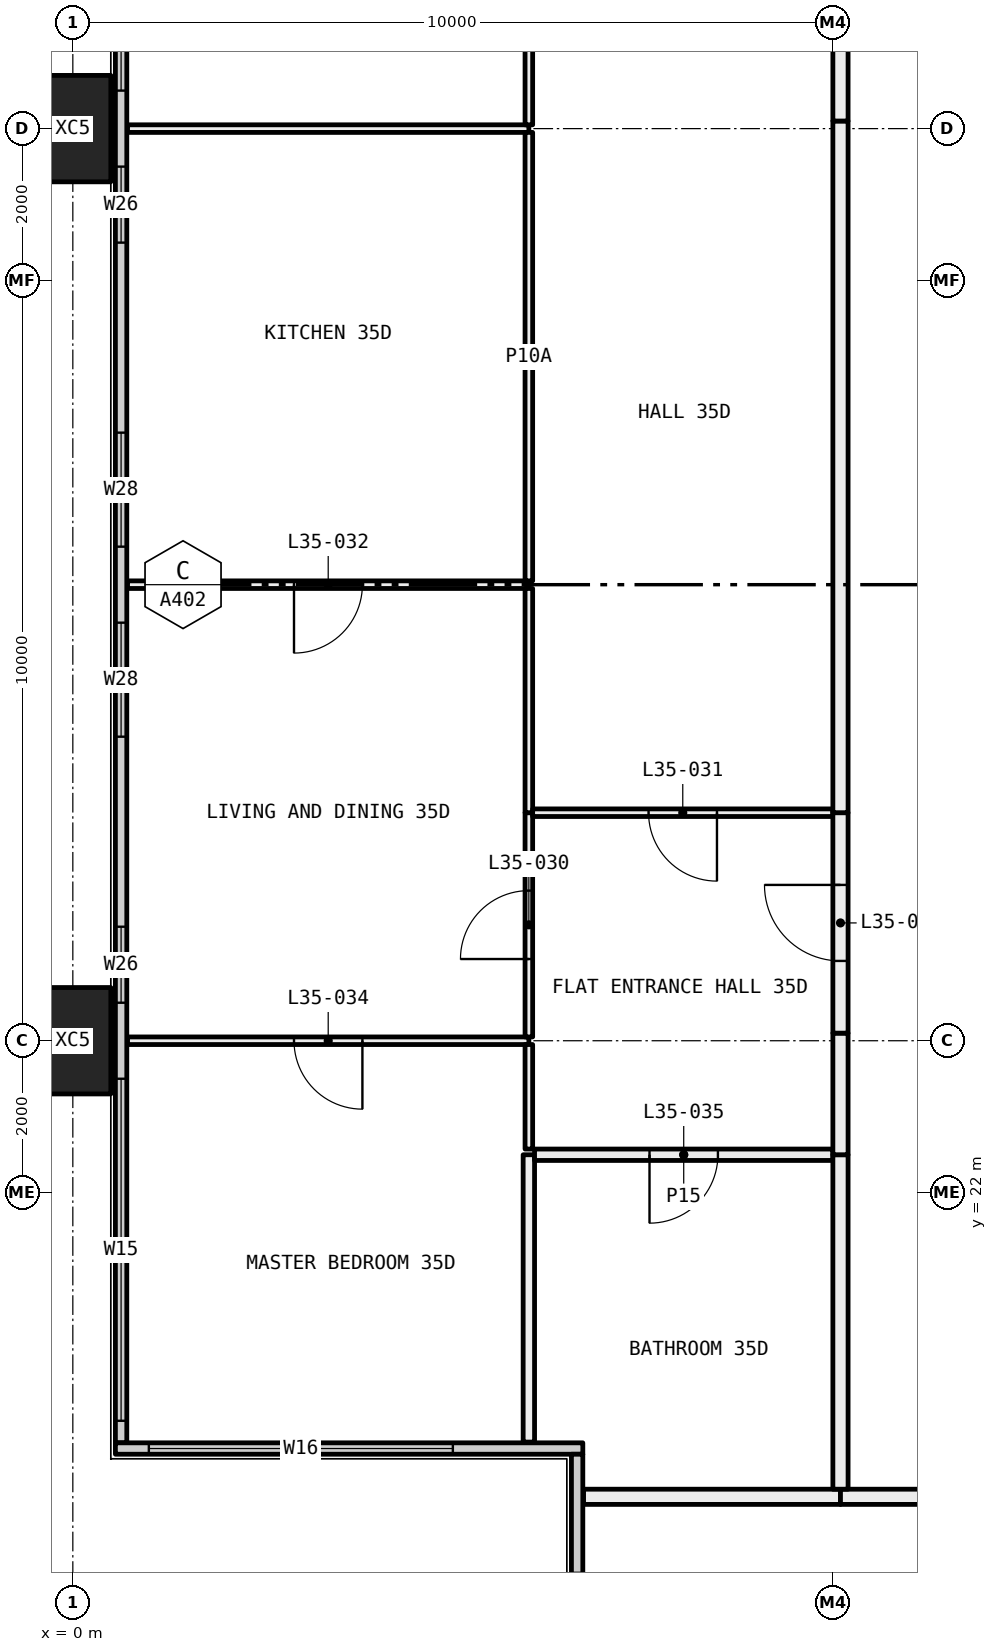
"""IFC4 building model, lengths in metres.
Left out: names, types, materials, properties, quantities, classifications, styles, units other than length and angle.
Written with IfcOpenShell. Run it as: python <this file> out.ifc"""

import sys

from ifc_helpers import new_model, si_unit, direction, frame, frame_2d, origin, origin_2d, place, context, subcontext, project, spatial, rectangle, hollow_rectangle, extrude, element, fill, save


model = new_model("IFC4")
c1 = context("Model", 3, precision=1e-05, world=origin(), true_north=direction((0.0, 1.0)))
c2 = subcontext(c1, "Body", "Model", "MODEL_VIEW")
j1 = project(units=[si_unit("LENGTHUNIT", "METRE"), si_unit("PLANEANGLEUNIT", "RADIAN")], contexts=[c1])
p1 = place(None, origin())
s1 = spatial("IfcSite", under=j1, at=p1, CompositionType="ELEMENT")
p2 = place(p1, origin())
s2 = spatial("IfcBuilding", under=s1, at=p2, CompositionType="ELEMENT")
p3 = place(p2, frame((0.0, 0.0, 134.55)))
s3 = spatial("IfcBuildingStorey", under=s2, at=p3, CompositionType="ELEMENT", Elevation=134.55)
for number, where, z_axis, x_axis in (
    (1, (0.0, 24.0, -0.4), (0.0, 0.0, 1.0), (0.0, 1.0, 0.0)),
    (2, (0.0, 36.0, -0.4), (0.0, 0.0, 1.0), (0.0, 1.0, 0.0)),
):
    element("IfcColumn", number, at=place(p3, frame(where, z_axis=z_axis, x_axis=x_axis)), inside=s3, PredefinedType="COLUMN", context=c2, shape_type="SweptSolid", body=[
        extrude(hollow_rectangle(XDim=1.4, YDim=1.0, WallThickness=0.055, at=origin_2d()), origin(), (0.0, 0.0, 1.0), 3.45),
    ])
p4 = place(p3, frame((0.635, 18.71, 0.0), z_axis=(0.0, 0.0, 1.0), x_axis=(0.0, 1.0, 0.0)))
e3 = element("IfcWall", 3, at=p4, inside=s3, PredefinedType="ELEMENTEDWALL", context=c2, shape_type="SweptSolid", body=[
    extrude(rectangle(XDim=22.58, YDim=0.15, at=frame_2d((11.29, 0.0))), origin(), (0.0, 0.0, 1.0), 3.05),
])
p5 = place(p4, frame((0.29, 0.0, 0.45)))
e4 = element("IfcOpeningElement", 4, at=p5, cuts=e3, PredefinedType="OPENING", context=c2, shape_type="SweptSolid", body=[
    extrude(rectangle(XDim=4.5, YDim=2.55, at=frame_2d((2.25, 1.275))), frame((0.0, 0.085, 0.0), z_axis=(0.0, -1.0, 0.0), x_axis=(1.0, 0.0, 0.0)), (0.0, 0.0, 1.0), 0.17),
])
p6 = place(p4, frame((5.79, 0.0, 0.45)))
e5 = element("IfcOpeningElement", 5, at=p6, cuts=e3, PredefinedType="OPENING", context=c2, shape_type="SweptSolid", body=[
    extrude(rectangle(XDim=1.0, YDim=2.55, at=frame_2d((0.5, 1.275))), frame((0.0, 0.085, 0.0), z_axis=(0.0, -1.0, 0.0), x_axis=(1.0, 0.0, 0.0)), (0.0, 0.0, 1.0), 0.17),
])
p7 = place(p4, frame((9.29, 0.0, 0.45)))
e6 = element("IfcOpeningElement", 6, at=p7, cuts=e3, PredefinedType="OPENING", context=c2, shape_type="SweptSolid", body=[
    extrude(rectangle(XDim=1.5, YDim=2.55, at=frame_2d((0.75, 1.275))), frame((0.0, 0.085, 0.0), z_axis=(0.0, -1.0, 0.0), x_axis=(1.0, 0.0, 0.0)), (0.0, 0.0, 1.0), 0.17),
])
p8 = place(p4, frame((11.79, 0.0, 0.45)))
e7 = element("IfcOpeningElement", 7, at=p8, cuts=e3, PredefinedType="OPENING", context=c2, shape_type="SweptSolid", body=[
    extrude(rectangle(XDim=1.5, YDim=2.55, at=frame_2d((0.75, 1.275))), frame((0.0, 0.085, 0.0), z_axis=(0.0, -1.0, 0.0), x_axis=(1.0, 0.0, 0.0)), (0.0, 0.0, 1.0), 0.17),
])
p9 = place(p4, frame((15.79, 0.0, 0.45)))
e8 = element("IfcOpeningElement", 8, at=p9, cuts=e3, PredefinedType="OPENING", context=c2, shape_type="SweptSolid", body=[
    extrude(rectangle(XDim=1.0, YDim=2.55, at=frame_2d((0.5, 1.275))), frame((0.0, 0.085, 0.0), z_axis=(0.0, -1.0, 0.0), x_axis=(1.0, 0.0, 0.0)), (0.0, 0.0, 1.0), 0.17),
])
p10 = place(p4, frame((17.79, 0.0, 0.45)))
e9 = element("IfcOpeningElement", 9, at=p10, cuts=e3, PredefinedType="OPENING", context=c2, shape_type="SweptSolid", body=[
    extrude(rectangle(XDim=4.5, YDim=2.55, at=frame_2d((2.25, 1.275))), frame((0.0, 0.085, 0.0), z_axis=(0.0, -1.0, 0.0), x_axis=(1.0, 0.0, 0.0)), (0.0, 0.0, 1.0), 0.17),
])
p11 = place(p3, frame((0.56, 18.635, 0.0), z_axis=(0.0, 0.0, 1.0), x_axis=(1.0, 0.0, 0.0)))
e10 = element("IfcWall", 10, at=p11, inside=s3, PredefinedType="ELEMENTEDWALL", context=c2, shape_type="SweptSolid", body=[
    extrude(rectangle(XDim=6.15, YDim=0.15, at=frame_2d((3.075, 0.0))), origin(), (0.0, 0.0, 1.0), 3.05),
])
p12 = place(p11, frame((0.44, 0.0, 0.45)))
e11 = element("IfcOpeningElement", 11, at=p12, cuts=e10, PredefinedType="OPENING", context=c2, shape_type="SweptSolid", body=[
    extrude(rectangle(XDim=4.0, YDim=2.55, at=frame_2d((2.0, 1.275))), frame((0.0, 0.085, 0.0), z_axis=(0.0, -1.0, 0.0), x_axis=(1.0, 0.0, 0.0)), (0.0, 0.0, 1.0), 0.17),
])
p13 = place(p3, frame((6.635, 12.71, 0.0), z_axis=(0.0, 0.0, 1.0), x_axis=(0.0, 1.0, 0.0)))
e12 = element("IfcWall", 12, at=p13, inside=s3, PredefinedType="ELEMENTEDWALL", context=c2, shape_type="SweptSolid", body=[
    extrude(rectangle(XDim=5.85, YDim=0.15, at=frame_2d((2.925, 0.0))), origin(), (0.0, 0.0, 1.0), 3.05),
])
p14 = place(p13, frame((0.29, 0.0, 0.45)))
e13 = element("IfcOpeningElement", 13, at=p14, cuts=e12, PredefinedType="OPENING", context=c2, shape_type="SweptSolid", body=[
    extrude(rectangle(XDim=4.0, YDim=2.55, at=frame_2d((2.0, 1.275))), frame((0.0, 0.085, 0.0), z_axis=(0.0, -1.0, 0.0), x_axis=(1.0, 0.0, 0.0)), (0.0, 0.0, 1.0), 0.17),
])
p15 = place(p3, frame((10.1, 18.0, 0.0), z_axis=(0.0, 0.0, 1.0), x_axis=(-1.0, 0.0, 0.0)))
e14 = element("IfcWall", 14, at=p15, inside=s3, PredefinedType="PARTITIONING", context=c2, shape_type="SweptSolid", body=[
    extrude(rectangle(XDim=3.38, YDim=0.2, at=frame_2d((1.69, 0.0))), origin(), (0.0, 0.0, 1.0), 3.05),
])
p16 = place(p3, frame((12.0, 18.0, 0.0), z_axis=(0.0, 0.0, 1.0), x_axis=(-1.0, 0.0, 0.0)))
e15 = element("IfcWall", 15, at=p16, inside=s3, PredefinedType="PARTITIONING", context=c2, shape_type="SweptSolid", body=[
    extrude(rectangle(XDim=1.9, YDim=0.2, at=frame_2d((0.95, 0.0))), origin(), (0.0, 0.0, 1.0), 3.05),
])
p17 = place(p3, frame((6.0, 24.0, 0.0), z_axis=(0.0, 0.0, 1.0), x_axis=(-1.0, 0.0, 0.0)))
e16 = element("IfcWall", 16, at=p17, inside=s3, PredefinedType="PARTITIONING", context=c2, shape_type="SweptSolid", body=[
    extrude(rectangle(XDim=5.28, YDim=0.1, at=frame_2d((2.64, 0.0))), origin(), (0.0, 0.0, 1.0), 2.45),
])
p18 = place(p17, frame((2.19, 0.0, 0.0)))
e17 = element("IfcOpeningElement", 17, at=p18, cuts=e16, PredefinedType="OPENING", context=c2, shape_type="SweptSolid", body=[
    extrude(rectangle(XDim=0.9, YDim=2.1, at=frame_2d((0.45, 1.05))), frame((0.0, 0.06, 0.0), z_axis=(0.0, -1.0, 0.0), x_axis=(1.0, 0.0, 0.0)), (0.0, 0.0, 1.0), 0.12),
])
p19 = place(p3, frame((6.0, 18.72, 0.0), z_axis=(0.0, 0.0, 1.0), x_axis=(0.0, 1.0, 0.0)))
e18 = element("IfcWall", 18, at=p19, inside=s3, PredefinedType="PARTITIONING", context=c2, shape_type="SweptSolid", body=[
    extrude(rectangle(XDim=3.78, YDim=0.15, at=frame_2d((1.89, 0.0))), origin(), (0.0, 0.0, 1.0), 3.05),
])
p20 = place(p3, frame((6.0, 22.575, 0.0), z_axis=(0.0, 0.0, 1.0), x_axis=(0.0, 1.0, 0.0)))
e19 = element("IfcWall", 19, at=p20, inside=s3, PredefinedType="PARTITIONING", context=c2, shape_type="SweptSolid", body=[
    extrude(rectangle(XDim=1.375, YDim=0.1, at=frame_2d((0.688, 0.0))), origin(), (0.0, 0.0, 1.0), 2.45),
])
p21 = place(p3, frame((6.0, 30.0, 0.0), z_axis=(0.0, 0.0, 1.0), x_axis=(-1.0, 0.0, 0.0)))
e20 = element("IfcWall", 20, at=p21, inside=s3, PredefinedType="PARTITIONING", context=c2, shape_type="SweptSolid", body=[
    extrude(rectangle(XDim=5.28, YDim=0.1, at=frame_2d((2.64, 0.0))), origin(), (0.0, 0.0, 1.0), 3.05),
])
p22 = place(p21, frame((2.19, 0.0, 0.0)))
e21 = element("IfcOpeningElement", 21, at=p22, cuts=e20, PredefinedType="OPENING", context=c2, shape_type="SweptSolid", body=[
    extrude(rectangle(XDim=0.9, YDim=2.1, at=frame_2d((0.45, 1.05))), frame((0.0, 0.06, 0.0), z_axis=(0.0, -1.0, 0.0), x_axis=(1.0, 0.0, 0.0)), (0.0, 0.0, 1.0), 0.12),
])
p23 = place(p3, frame((6.0, 24.05, 0.0), z_axis=(0.0, 0.0, 1.0), x_axis=(0.0, 1.0, 0.0)))
e22 = element("IfcWall", 22, at=p23, inside=s3, PredefinedType="PARTITIONING", context=c2, shape_type="SweptSolid", body=[
    extrude(rectangle(XDim=2.95, YDim=0.1, at=frame_2d((1.475, 0.0))), origin(), (0.0, 0.0, 1.0), 2.45),
])
p24 = place(p23, frame((1.025, 0.0, 0.0)))
e23 = element("IfcOpeningElement", 23, at=p24, cuts=e22, PredefinedType="OPENING", context=c2, shape_type="SweptSolid", body=[
    extrude(rectangle(XDim=0.9, YDim=2.1, at=frame_2d((0.45, 1.05))), frame((0.0, 0.06, 0.0), z_axis=(0.0, -1.0, 0.0), x_axis=(1.0, 0.0, 0.0)), (0.0, 0.0, 1.0), 0.12),
])
p25 = place(p3, frame((6.0, 27.0, 0.0), z_axis=(0.0, 0.0, 1.0), x_axis=(0.0, 1.0, 0.0)))
e24 = element("IfcWall", 24, at=p25, inside=s3, PredefinedType="PARTITIONING", context=c2, shape_type="SweptSolid", body=[
    extrude(rectangle(XDim=2.95, YDim=0.1, at=frame_2d((1.475, 0.0))), origin(), (0.0, 0.0, 1.0), 3.05),
])
p26 = place(p3, frame((6.0, 36.0, 0.0), z_axis=(0.0, 0.0, 1.0), x_axis=(-1.0, 0.0, 0.0)))
e25 = element("IfcWall", 25, at=p26, inside=s3, PredefinedType="PARTITIONING", context=c2, shape_type="SweptSolid", body=[
    extrude(rectangle(XDim=5.28, YDim=0.1, at=frame_2d((2.64, 0.0))), origin(), (0.0, 0.0, 1.0), 2.45),
])
p27 = place(p3, frame((6.0, 30.05, 0.0), z_axis=(0.0, 0.0, 1.0), x_axis=(0.0, 1.0, 0.0)))
e26 = element("IfcWall", 26, at=p27, inside=s3, PredefinedType="PARTITIONING", context=c2, shape_type="SweptSolid", body=[
    extrude(rectangle(XDim=5.9, YDim=0.1, at=frame_2d((2.95, 0.0))), origin(), (0.0, 0.0, 1.0), 2.45),
])
p28 = place(p3, frame((6.0, 36.05, 0.0), z_axis=(0.0, 0.0, 1.0), x_axis=(0.0, 1.0, 0.0)))
e27 = element("IfcWall", 27, at=p28, inside=s3, PredefinedType="PARTITIONING", context=c2, shape_type="SweptSolid", body=[
    extrude(rectangle(XDim=2.875, YDim=0.1, at=frame_2d((1.438, 0.0))), origin(), (0.0, 0.0, 1.0), 2.45),
])
p29 = place(p28, frame((0.988, 0.0, 0.0)))
e28 = element("IfcOpeningElement", 28, at=p29, cuts=e27, PredefinedType="OPENING", context=c2, shape_type="SweptSolid", body=[
    extrude(rectangle(XDim=0.9, YDim=2.1, at=frame_2d((0.45, 1.05))), frame((0.0, 0.06, 0.0), z_axis=(0.0, -1.0, 0.0), x_axis=(1.0, 0.0, 0.0)), (0.0, 0.0, 1.0), 0.12),
])
p30 = place(p3, frame((10.0, 22.5, 0.0), z_axis=(0.0, 0.0, 1.0), x_axis=(-1.0, 0.0, 0.0)))
e29 = element("IfcWall", 29, at=p30, inside=s3, PredefinedType="PARTITIONING", context=c2, shape_type="SweptSolid", body=[
    extrude(rectangle(XDim=3.925, YDim=0.15, at=frame_2d((1.962, 0.0))), origin(), (0.0, 0.0, 1.0), 3.05),
])
p31 = place(p30, frame((1.512, 0.0, 0.0)))
e30 = element("IfcOpeningElement", 30, at=p31, cuts=e29, PredefinedType="OPENING", context=c2, shape_type="SweptSolid", body=[
    extrude(rectangle(XDim=0.9, YDim=2.1, at=frame_2d((0.45, 1.05))), frame((0.0, 0.085, 0.0), z_axis=(0.0, -1.0, 0.0), x_axis=(1.0, 0.0, 0.0)), (0.0, 0.0, 1.0), 0.17),
])
p32 = place(p3, frame((10.1, 18.1, 0.0), z_axis=(0.0, 0.0, 1.0), x_axis=(0.0, 1.0, 0.0)))
e31 = element("IfcWall", 31, at=p32, inside=s3, PredefinedType="PARTITIONING", context=c2, shape_type="SweptSolid", body=[
    extrude(rectangle(XDim=4.4, YDim=0.2, at=frame_2d((2.2, 0.0))), origin(), (0.0, 0.0, 1.0), 3.05),
])
p33 = place(p3, frame((10.0, 27.0, 0.0), z_axis=(0.0, 0.0, 1.0), x_axis=(-1.0, 0.0, 0.0)))
e32 = element("IfcWall", 32, at=p33, inside=s3, PredefinedType="PARTITIONING", context=c2, shape_type="SweptSolid", body=[
    extrude(rectangle(XDim=3.95, YDim=0.1, at=frame_2d((1.975, 0.0))), origin(), (0.0, 0.0, 1.0), 3.05),
])
p34 = place(p33, frame((1.525, 0.0, 0.0)))
e33 = element("IfcOpeningElement", 33, at=p34, cuts=e32, PredefinedType="OPENING", context=c2, shape_type="SweptSolid", body=[
    extrude(rectangle(XDim=0.9, YDim=2.1, at=frame_2d((0.45, 1.05))), frame((0.0, 0.06, 0.0), z_axis=(0.0, -1.0, 0.0), x_axis=(1.0, 0.0, 0.0)), (0.0, 0.0, 1.0), 0.12),
])
p35 = place(p3, frame((10.1, 22.5, 0.0), z_axis=(0.0, 0.0, 1.0), x_axis=(0.0, 1.0, 0.0)))
e34 = element("IfcWall", 34, at=p35, inside=s3, PredefinedType="PARTITIONING", context=c2, shape_type="SweptSolid", body=[
    extrude(rectangle(XDim=1.6, YDim=0.2, at=frame_2d((0.8, 0.0))), origin(), (0.0, 0.0, 1.0), 2.45),
])
p36 = place(p3, frame((10.1, 24.1, 0.0), z_axis=(0.0, 0.0, 1.0), x_axis=(0.0, 1.0, 0.0)))
e35 = element("IfcWall", 35, at=p36, inside=s3, PredefinedType="PARTITIONING", context=c2, shape_type="SweptSolid", body=[
    extrude(rectangle(XDim=2.9, YDim=0.2, at=frame_2d((1.45, 0.0))), origin(), (0.0, 0.0, 1.0), 3.05),
])
p37 = place(p36, frame((0.95, 0.0, 0.0)))
e36 = element("IfcOpeningElement", 36, at=p37, cuts=e35, PredefinedType="OPENING", context=c2, shape_type="SweptSolid", body=[
    extrude(rectangle(XDim=1.0, YDim=2.1, at=frame_2d((0.5, 1.05))), frame((0.0, 0.11, 0.0), z_axis=(0.0, -1.0, 0.0), x_axis=(1.0, 0.0, 0.0)), (0.0, 0.0, 1.0), 0.22),
])
p38 = place(p3, frame((10.1, 27.0, 0.0), z_axis=(0.0, 0.0, 1.0), x_axis=(0.0, 1.0, 0.0)))
e37 = element("IfcWall", 37, at=p38, inside=s3, PredefinedType="PARTITIONING", context=c2, shape_type="SweptSolid", body=[
    extrude(rectangle(XDim=9.1, YDim=0.2, at=frame_2d((4.55, 0.0))), origin(), (0.0, 0.0, 1.0), 2.45),
])
p39 = place(p3, frame((10.1, 36.1, 0.0), z_axis=(0.0, 0.0, 1.0), x_axis=(0.0, 1.0, 0.0)))
e38 = element("IfcWall", 38, at=p39, inside=s3, PredefinedType="PARTITIONING", context=c2, shape_type="SweptSolid", body=[
    extrude(rectangle(XDim=2.9, YDim=0.2, at=frame_2d((1.45, 0.0))), origin(), (0.0, 0.0, 1.0), 3.05),
])
p40 = place(p5, origin())
e39 = element("IfcWindow", 39, at=p40, inside=s3, PartitioningType="SINGLE_PANEL", PredefinedType="WINDOW", context=c2, shape_type="SweptSolid", body=[
    extrude(rectangle(XDim=4.5, YDim=2.55, at=frame_2d((2.25, 1.275))), frame((0.0, 0.03, 0.0), z_axis=(0.0, -1.0, 0.0), x_axis=(1.0, 0.0, 0.0)), (0.0, 0.0, 1.0), 0.06),
])
fill(e4, e39)
p41 = place(p6, origin())
e40 = element("IfcWindow", 40, at=p41, inside=s3, PartitioningType="SINGLE_PANEL", PredefinedType="WINDOW", context=c2, shape_type="SweptSolid", body=[
    extrude(rectangle(XDim=1.0, YDim=2.55, at=frame_2d((0.5, 1.275))), frame((0.0, 0.03, 0.0), z_axis=(0.0, -1.0, 0.0), x_axis=(1.0, 0.0, 0.0)), (0.0, 0.0, 1.0), 0.06),
])
fill(e5, e40)
p42 = place(p7, origin())
e41 = element("IfcWindow", 41, at=p42, inside=s3, PartitioningType="SINGLE_PANEL", PredefinedType="WINDOW", context=c2, shape_type="SweptSolid", body=[
    extrude(rectangle(XDim=1.5, YDim=2.55, at=frame_2d((0.75, 1.275))), frame((0.0, 0.03, 0.0), z_axis=(0.0, -1.0, 0.0), x_axis=(1.0, 0.0, 0.0)), (0.0, 0.0, 1.0), 0.06),
])
fill(e6, e41)
p43 = place(p8, origin())
e42 = element("IfcWindow", 42, at=p43, inside=s3, PartitioningType="SINGLE_PANEL", PredefinedType="WINDOW", context=c2, shape_type="SweptSolid", body=[
    extrude(rectangle(XDim=1.5, YDim=2.55, at=frame_2d((0.75, 1.275))), frame((0.0, 0.03, 0.0), z_axis=(0.0, -1.0, 0.0), x_axis=(1.0, 0.0, 0.0)), (0.0, 0.0, 1.0), 0.06),
])
fill(e7, e42)
p44 = place(p9, origin())
e43 = element("IfcWindow", 43, at=p44, inside=s3, PartitioningType="SINGLE_PANEL", PredefinedType="WINDOW", context=c2, shape_type="SweptSolid", body=[
    extrude(rectangle(XDim=1.0, YDim=2.55, at=frame_2d((0.5, 1.275))), frame((0.0, 0.03, 0.0), z_axis=(0.0, -1.0, 0.0), x_axis=(1.0, 0.0, 0.0)), (0.0, 0.0, 1.0), 0.06),
])
fill(e8, e43)
p45 = place(p10, origin())
e44 = element("IfcWindow", 44, at=p45, inside=s3, PartitioningType="SINGLE_PANEL", PredefinedType="WINDOW", context=c2, shape_type="SweptSolid", body=[
    extrude(rectangle(XDim=4.5, YDim=2.55, at=frame_2d((2.25, 1.275))), frame((0.0, 0.03, 0.0), z_axis=(0.0, -1.0, 0.0), x_axis=(1.0, 0.0, 0.0)), (0.0, 0.0, 1.0), 0.06),
])
fill(e9, e44)
p46 = place(p12, origin())
e45 = element("IfcWindow", 45, at=p46, inside=s3, PartitioningType="SINGLE_PANEL", PredefinedType="WINDOW", context=c2, shape_type="SweptSolid", body=[
    extrude(rectangle(XDim=4.0, YDim=2.55, at=frame_2d((2.0, 1.275))), frame((0.0, 0.03, 0.0), z_axis=(0.0, -1.0, 0.0), x_axis=(1.0, 0.0, 0.0)), (0.0, 0.0, 1.0), 0.06),
])
fill(e11, e45)
p47 = place(p37, origin())
e46 = element("IfcDoor", 46, at=p47, inside=s3, OperationType="SINGLE_SWING_LEFT", PredefinedType="DOOR", context=c2, shape_type="SweptSolid", body=[
    extrude(rectangle(XDim=1.0, YDim=2.1, at=frame_2d((0.5, 1.05))), frame((0.0, 0.025, 0.0), z_axis=(0.0, -1.0, 0.0), x_axis=(1.0, 0.0, 0.0)), (0.0, 0.0, 1.0), 0.05),
])
fill(e36, e46)
p48 = place(p24, origin())
e47 = element("IfcDoor", 47, at=p48, inside=s3, OperationType="SINGLE_SWING_RIGHT", PredefinedType="DOOR", context=c2, shape_type="SweptSolid", body=[
    extrude(rectangle(XDim=0.9, YDim=2.1, at=frame_2d((0.45, 1.05))), frame((0.0, 0.025, 0.0), z_axis=(0.0, -1.0, 0.0), x_axis=(1.0, 0.0, 0.0)), (0.0, 0.0, 1.0), 0.05),
])
fill(e23, e47)
p49 = place(p34, origin())
e48 = element("IfcDoor", 48, at=p49, inside=s3, OperationType="SINGLE_SWING_RIGHT", PredefinedType="DOOR", context=c2, shape_type="SweptSolid", body=[
    extrude(rectangle(XDim=0.9, YDim=2.1, at=frame_2d((0.45, 1.05))), frame((0.0, 0.025, 0.0), z_axis=(0.0, -1.0, 0.0), x_axis=(1.0, 0.0, 0.0)), (0.0, 0.0, 1.0), 0.05),
])
fill(e33, e48)
p50 = place(p22, origin())
e49 = element("IfcDoor", 49, at=p50, inside=s3, OperationType="SINGLE_SWING_LEFT", PredefinedType="DOOR", context=c2, shape_type="SweptSolid", body=[
    extrude(rectangle(XDim=0.9, YDim=2.1, at=frame_2d((0.45, 1.05))), frame((0.0, 0.025, 0.0), z_axis=(0.0, -1.0, 0.0), x_axis=(1.0, 0.0, 0.0)), (0.0, 0.0, 1.0), 0.05),
])
fill(e21, e49)
p51 = place(p18, origin())
e50 = element("IfcDoor", 50, at=p51, inside=s3, OperationType="SINGLE_SWING_RIGHT", PredefinedType="DOOR", context=c2, shape_type="SweptSolid", body=[
    extrude(rectangle(XDim=0.9, YDim=2.1, at=frame_2d((0.45, 1.05))), frame((0.0, 0.025, 0.0), z_axis=(0.0, -1.0, 0.0), x_axis=(1.0, 0.0, 0.0)), (0.0, 0.0, 1.0), 0.05),
])
fill(e17, e50)
p52 = place(p31, origin())
e51 = element("IfcDoor", 51, at=p52, inside=s3, OperationType="SINGLE_SWING_LEFT", PredefinedType="DOOR", context=c2, shape_type="SweptSolid", body=[
    extrude(rectangle(XDim=0.9, YDim=2.1, at=frame_2d((0.45, 1.05))), frame((0.0, 0.025, 0.0), z_axis=(0.0, -1.0, 0.0), x_axis=(1.0, 0.0, 0.0)), (0.0, 0.0, 1.0), 0.05),
])
fill(e30, e51)
save(model, sys.argv[1])
